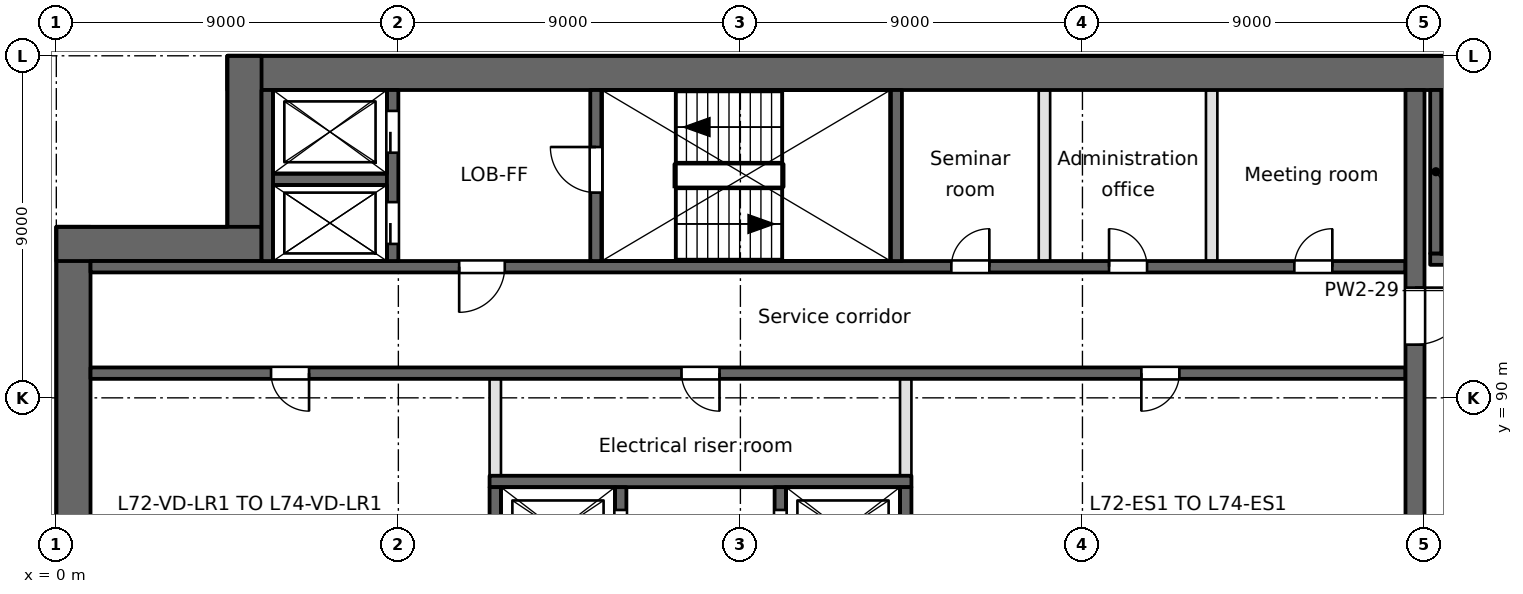
"""IFC4 building model, lengths in metres.
Left out: names, types, materials, properties, quantities, classifications, styles, units other than length and angle.
Written with IfcOpenShell. Run it as: python <this file> out.ifc"""

import sys

from ifc_helpers import new_model, si_unit, direction, frame, frame_2d, origin, place, context, subcontext, project, spatial, rectangle, extrude, element, fill, save


model = new_model("IFC4")
c1 = context("Model", 3, precision=1e-05, world=origin(), true_north=direction((0.0, 1.0)))
c2 = subcontext(c1, "Body", "Model", "MODEL_VIEW")
j1 = project(units=[si_unit("LENGTHUNIT", "METRE"), si_unit("PLANEANGLEUNIT", "RADIAN")], contexts=[c1])
p1 = place(None, origin())
s1 = spatial("IfcSite", under=j1, at=p1, CompositionType="ELEMENT")
p2 = place(p1, origin())
s2 = spatial("IfcBuilding", under=s1, at=p2, CompositionType="ELEMENT")
p3 = place(p2, frame((0.0, 0.0, 280.8)))
s3 = spatial("IfcBuildingStorey", under=s2, at=p3, CompositionType="ELEMENT", Elevation=280.8)
p4 = place(p3, frame((0.45, 94.5, 0.0), z_axis=(0.0, 0.0, 1.0), x_axis=(0.0, -1.0, 0.0)))
e1 = element("IfcWall", 1, at=p4, inside=s3, PredefinedType="SHEAR", context=c2, shape_type="SweptSolid", body=[
    extrude(rectangle(XDim=40.456, YDim=0.9, at=frame_2d((20.228, 0.0))), origin(), (0.0, 0.0, 1.0), 3.7),
])
p5 = place(p3, frame((49.5, 98.55, 0.0), z_axis=(0.0, 0.0, 1.0), x_axis=(-1.0, 0.0, 0.0)))
e2 = element("IfcWall", 2, at=p5, inside=s3, PredefinedType="SHEAR", context=c2, shape_type="SweptSolid", body=[
    extrude(rectangle(XDim=45.0, YDim=0.9, at=frame_2d((22.5, 0.0))), origin(), (0.0, 0.0, 1.0), 3.7),
])
for number, where, z_axis, x_axis in (
    (3, (4.95, 99.0, 0.0), (0.0, 0.0, 1.0), (0.0, -1.0, 0.0)),
    (4, (5.4, 94.05, 0.0), (0.0, 0.0, 1.0), (-1.0, 0.0, 0.0)),
):
    element("IfcWall", number, at=place(p3, frame(where, z_axis=z_axis, x_axis=x_axis)), inside=s3, PredefinedType="SHEAR", context=c2, shape_type="SweptSolid", body=[
        extrude(rectangle(XDim=5.4, YDim=0.9, at=frame_2d((2.7, 0.0))), origin(), (0.0, 0.0, 1.0), 3.7),
    ])
p6 = place(p3, frame((11.4, 87.8, -0.4), z_axis=(0.0, 0.0, 1.0), x_axis=(1.0, 0.0, 0.0)))
e5 = element("IfcWall", 5, at=p6, inside=s3, PredefinedType="SOLIDWALL", context=c2, shape_type="SweptSolid", body=[
    extrude(rectangle(XDim=11.1, YDim=0.3, at=frame_2d((5.55, 0.0))), origin(), (0.0, 0.0, 1.0), 3.7),
])
p7 = place(p3, frame((0.9, 90.65, -0.4), z_axis=(0.0, 0.0, 1.0), x_axis=(1.0, 0.0, 0.0)))
e6 = element("IfcWall", 6, at=p7, inside=s3, PredefinedType="SOLIDWALL", context=c2, shape_type="SweptSolid", body=[
    extrude(rectangle(XDim=34.6, YDim=0.3, at=frame_2d((17.3, 0.0))), origin(), (0.0, 0.0, 1.0), 3.7),
])
p8 = place(p7, frame((15.55, 0.0, 0.4)))
e7 = element("IfcOpeningElement", 7, at=p8, cuts=e6, PredefinedType="OPENING", context=c2, shape_type="SweptSolid", body=[
    extrude(rectangle(XDim=1.0, YDim=2.1, at=frame_2d((0.5, 1.05))), frame((0.0, 0.15, 0.0), z_axis=(0.0, -1.0, 0.0), x_axis=(1.0, 0.0, 0.0)), (0.0, 0.0, 1.0), 0.3),
])
p9 = place(p7, frame((4.75, 0.0, 0.4)))
e8 = element("IfcOpeningElement", 8, at=p9, cuts=e6, PredefinedType="OPENING", context=c2, shape_type="SweptSolid", body=[
    extrude(rectangle(XDim=1.0, YDim=2.1, at=frame_2d((0.5, 1.05))), frame((0.0, 0.15, 0.0), z_axis=(0.0, -1.0, 0.0), x_axis=(1.0, 0.0, 0.0)), (0.0, 0.0, 1.0), 0.3),
])
p10 = place(p7, frame((27.65, 0.0, 0.4)))
e9 = element("IfcOpeningElement", 9, at=p10, cuts=e6, PredefinedType="OPENING", context=c2, shape_type="SweptSolid", body=[
    extrude(rectangle(XDim=1.0, YDim=2.1, at=frame_2d((0.5, 1.05))), frame((0.0, 0.15, 0.0), z_axis=(0.0, -1.0, 0.0), x_axis=(1.0, 0.0, 0.0)), (0.0, 0.0, 1.0), 0.3),
])
p11 = place(p3, frame((0.9, 93.45, -0.4), z_axis=(0.0, 0.0, 1.0), x_axis=(1.0, 0.0, 0.0)))
e10 = element("IfcWall", 10, at=p11, inside=s3, PredefinedType="SOLIDWALL", context=c2, shape_type="SweptSolid", body=[
    extrude(rectangle(XDim=34.6, YDim=0.3, at=frame_2d((17.3, 0.0))), origin(), (0.0, 0.0, 1.0), 3.7),
])
p12 = place(p11, frame((9.7, 0.0, 0.4)))
e11 = element("IfcOpeningElement", 11, at=p12, cuts=e10, PredefinedType="OPENING", context=c2, shape_type="SweptSolid", body=[
    extrude(rectangle(XDim=1.2, YDim=2.1, at=frame_2d((0.6, 1.05))), frame((0.0, 0.15, 0.0), z_axis=(0.0, -1.0, 0.0), x_axis=(1.0, 0.0, 0.0)), (0.0, 0.0, 1.0), 0.3),
])
p13 = place(p11, frame((22.65, 0.0, 0.4)))
e12 = element("IfcOpeningElement", 12, at=p13, cuts=e10, PredefinedType="OPENING", context=c2, shape_type="SweptSolid", body=[
    extrude(rectangle(XDim=1.0, YDim=2.1, at=frame_2d((0.5, 1.05))), frame((0.0, 0.15, 0.0), z_axis=(0.0, -1.0, 0.0), x_axis=(1.0, 0.0, 0.0)), (0.0, 0.0, 1.0), 0.3),
])
p14 = place(p11, frame((26.8, 0.0, 0.4)))
e13 = element("IfcOpeningElement", 13, at=p14, cuts=e10, PredefinedType="OPENING", context=c2, shape_type="SweptSolid", body=[
    extrude(rectangle(XDim=1.0, YDim=2.1, at=frame_2d((0.5, 1.05))), frame((0.0, 0.15, 0.0), z_axis=(0.0, -1.0, 0.0), x_axis=(1.0, 0.0, 0.0)), (0.0, 0.0, 1.0), 0.3),
])
p15 = place(p11, frame((31.675, 0.0, 0.4)))
e14 = element("IfcOpeningElement", 14, at=p15, cuts=e10, PredefinedType="OPENING", context=c2, shape_type="SweptSolid", body=[
    extrude(rectangle(XDim=1.0, YDim=2.1, at=frame_2d((0.5, 1.05))), frame((0.0, 0.15, 0.0), z_axis=(0.0, -1.0, 0.0), x_axis=(1.0, 0.0, 0.0)), (0.0, 0.0, 1.0), 0.3),
])
p16 = place(p3, frame((36.15, 93.65, -0.4), z_axis=(0.0, 0.0, 1.0), x_axis=(1.0, 0.0, 0.0)))
e15 = element("IfcWall", 15, at=p16, inside=s3, PredefinedType="SOLIDWALL", context=c2, shape_type="SweptSolid", body=[
    extrude(rectangle(XDim=8.2, YDim=0.3, at=frame_2d((4.1, 0.0))), origin(), (0.0, 0.0, 1.0), 3.7),
])
p17 = place(p16, frame((0.7, 0.0, 0.4)))
e16 = element("IfcOpeningElement", 16, at=p17, cuts=e15, PredefinedType="OPENING", context=c2, shape_type="SweptSolid", body=[
    extrude(rectangle(XDim=1.2, YDim=2.1, at=frame_2d((0.6, 1.05))), frame((0.0, 0.15, 0.0), z_axis=(0.0, -1.0, 0.0), x_axis=(1.0, 0.0, 0.0)), (0.0, 0.0, 1.0), 0.3),
])
p18 = place(p3, frame((5.7, 95.75, -0.4), z_axis=(0.0, 0.0, 1.0), x_axis=(1.0, 0.0, 0.0)))
e17 = element("IfcWall", 17, at=p18, inside=s3, PredefinedType="SOLIDWALL", context=c2, shape_type="SweptSolid", body=[
    extrude(rectangle(XDim=3.0, YDim=0.3, at=frame_2d((1.5, 0.0))), origin(), (0.0, 0.0, 1.0), 3.7),
])
p19 = place(p3, frame((5.55, 93.6, -0.4), z_axis=(0.0, 0.0, 1.0), x_axis=(0.0, 1.0, 0.0)))
e18 = element("IfcWall", 18, at=p19, inside=s3, PredefinedType="SOLIDWALL", context=c2, shape_type="SweptSolid", body=[
    extrude(rectangle(XDim=4.5, YDim=0.3, at=frame_2d((2.25, 0.0))), origin(), (0.0, 0.0, 1.0), 3.7),
])
p20 = place(p3, frame((8.85, 93.6, -0.4), z_axis=(0.0, 0.0, 1.0), x_axis=(0.0, 1.0, 0.0)))
e19 = element("IfcWall", 19, at=p20, inside=s3, PredefinedType="SOLIDWALL", context=c2, shape_type="SweptSolid", body=[
    extrude(rectangle(XDim=4.5, YDim=0.3, at=frame_2d((2.25, 0.0))), origin(), (0.0, 0.0, 1.0), 3.7),
])
p21 = place(p20, frame((0.45, 0.0, 0.4)))
e20 = element("IfcOpeningElement", 20, at=p21, cuts=e19, PredefinedType="OPENING", context=c2, shape_type="SweptSolid", body=[
    extrude(rectangle(XDim=1.1, YDim=2.1, at=frame_2d((0.55, 1.05))), frame((0.0, 0.15, 0.0), z_axis=(0.0, -1.0, 0.0), x_axis=(1.0, 0.0, 0.0)), (0.0, 0.0, 1.0), 0.3),
])
p22 = place(p20, frame((2.85, 0.0, 0.4)))
e21 = element("IfcOpeningElement", 21, at=p22, cuts=e19, PredefinedType="OPENING", context=c2, shape_type="SweptSolid", body=[
    extrude(rectangle(XDim=1.1, YDim=2.1, at=frame_2d((0.55, 1.05))), frame((0.0, 0.15, 0.0), z_axis=(0.0, -1.0, 0.0), x_axis=(1.0, 0.0, 0.0)), (0.0, 0.0, 1.0), 0.3),
])
p23 = place(p3, frame((11.55, 77.55, -0.4), z_axis=(0.0, 0.0, 1.0), x_axis=(0.0, 1.0, 0.0)))
e22 = element("IfcWall", 22, at=p23, inside=s3, PredefinedType="SOLIDWALL", context=c2, shape_type="SweptSolid", body=[
    extrude(rectangle(XDim=10.1, YDim=0.3, at=frame_2d((5.05, 0.0))), origin(), (0.0, 0.0, 1.0), 3.7),
])
p24 = place(p3, frame((11.55, 87.95, 0.0), z_axis=(0.0, 0.0, 1.0), x_axis=(0.0, 1.0, 0.0)))
e23 = element("IfcWall", 23, at=p24, inside=s3, PredefinedType="PARTITIONING", context=c2, shape_type="SweptSolid", body=[
    extrude(rectangle(XDim=2.55, YDim=0.3, at=frame_2d((1.275, 0.0))), origin(), (0.0, 0.0, 1.0), 3.3),
])
p25 = place(p3, frame((14.2, 93.6, -0.4), z_axis=(0.0, 0.0, 1.0), x_axis=(0.0, 1.0, 0.0)))
e24 = element("IfcWall", 24, at=p25, inside=s3, PredefinedType="SOLIDWALL", context=c2, shape_type="SweptSolid", body=[
    extrude(rectangle(XDim=4.5, YDim=0.3, at=frame_2d((2.25, 0.0))), origin(), (0.0, 0.0, 1.0), 3.7),
])
p26 = place(p25, frame((1.8, 0.0, 0.4)))
e25 = element("IfcOpeningElement", 25, at=p26, cuts=e24, PredefinedType="OPENING", context=c2, shape_type="SweptSolid", body=[
    extrude(rectangle(XDim=1.2, YDim=2.1, at=frame_2d((0.6, 1.05))), frame((0.0, 0.15, 0.0), z_axis=(0.0, -1.0, 0.0), x_axis=(1.0, 0.0, 0.0)), (0.0, 0.0, 1.0), 0.3),
])
p27 = place(p3, frame((14.85, 77.55, -0.4), z_axis=(0.0, 0.0, 1.0), x_axis=(0.0, 1.0, 0.0)))
e26 = element("IfcWall", 26, at=p27, inside=s3, PredefinedType="SOLIDWALL", context=c2, shape_type="SweptSolid", body=[
    extrude(rectangle(XDim=10.1, YDim=0.3, at=frame_2d((5.05, 0.0))), origin(), (0.0, 0.0, 1.0), 3.7),
])
p28 = place(p27, frame((0.6, 0.0, 0.4)))
e27 = element("IfcOpeningElement", 27, at=p28, cuts=e26, PredefinedType="OPENING", context=c2, shape_type="SweptSolid", body=[
    extrude(rectangle(XDim=1.1, YDim=2.1, at=frame_2d((0.55, 1.05))), frame((0.0, 0.15, 0.0), z_axis=(0.0, -1.0, 0.0), x_axis=(1.0, 0.0, 0.0)), (0.0, 0.0, 1.0), 0.3),
])
p29 = place(p27, frame((3.2, 0.0, 0.4)))
e28 = element("IfcOpeningElement", 28, at=p29, cuts=e26, PredefinedType="OPENING", context=c2, shape_type="SweptSolid", body=[
    extrude(rectangle(XDim=1.1, YDim=2.1, at=frame_2d((0.55, 1.05))), frame((0.0, 0.15, 0.0), z_axis=(0.0, -1.0, 0.0), x_axis=(1.0, 0.0, 0.0)), (0.0, 0.0, 1.0), 0.3),
])
p30 = place(p27, frame((5.8, 0.0, 0.4)))
e29 = element("IfcOpeningElement", 29, at=p30, cuts=e26, PredefinedType="OPENING", context=c2, shape_type="SweptSolid", body=[
    extrude(rectangle(XDim=1.1, YDim=2.1, at=frame_2d((0.55, 1.05))), frame((0.0, 0.15, 0.0), z_axis=(0.0, -1.0, 0.0), x_axis=(1.0, 0.0, 0.0)), (0.0, 0.0, 1.0), 0.3),
])
p31 = place(p27, frame((8.4, 0.0, 0.4)))
e30 = element("IfcOpeningElement", 30, at=p31, cuts=e26, PredefinedType="OPENING", context=c2, shape_type="SweptSolid", body=[
    extrude(rectangle(XDim=1.1, YDim=2.1, at=frame_2d((0.55, 1.05))), frame((0.0, 0.15, 0.0), z_axis=(0.0, -1.0, 0.0), x_axis=(1.0, 0.0, 0.0)), (0.0, 0.0, 1.0), 0.3),
])
p32 = place(p3, frame((19.05, 77.55, -0.4), z_axis=(0.0, 0.0, 1.0), x_axis=(0.0, 1.0, 0.0)))
e31 = element("IfcWall", 31, at=p32, inside=s3, PredefinedType="SOLIDWALL", context=c2, shape_type="SweptSolid", body=[
    extrude(rectangle(XDim=10.1, YDim=0.3, at=frame_2d((5.05, 0.0))), origin(), (0.0, 0.0, 1.0), 3.7),
])
p33 = place(p32, frame((0.6, 0.0, 0.4)))
e32 = element("IfcOpeningElement", 32, at=p33, cuts=e31, PredefinedType="OPENING", context=c2, shape_type="SweptSolid", body=[
    extrude(rectangle(XDim=1.1, YDim=2.1, at=frame_2d((0.55, 1.05))), frame((0.0, 0.15, 0.0), z_axis=(0.0, -1.0, 0.0), x_axis=(1.0, 0.0, 0.0)), (0.0, 0.0, 1.0), 0.3),
])
p34 = place(p32, frame((3.2, 0.0, 0.4)))
e33 = element("IfcOpeningElement", 33, at=p34, cuts=e31, PredefinedType="OPENING", context=c2, shape_type="SweptSolid", body=[
    extrude(rectangle(XDim=1.1, YDim=2.1, at=frame_2d((0.55, 1.05))), frame((0.0, 0.15, 0.0), z_axis=(0.0, -1.0, 0.0), x_axis=(1.0, 0.0, 0.0)), (0.0, 0.0, 1.0), 0.3),
])
p35 = place(p32, frame((5.8, 0.0, 0.4)))
e34 = element("IfcOpeningElement", 34, at=p35, cuts=e31, PredefinedType="OPENING", context=c2, shape_type="SweptSolid", body=[
    extrude(rectangle(XDim=1.1, YDim=2.1, at=frame_2d((0.55, 1.05))), frame((0.0, 0.15, 0.0), z_axis=(0.0, -1.0, 0.0), x_axis=(1.0, 0.0, 0.0)), (0.0, 0.0, 1.0), 0.3),
])
p36 = place(p32, frame((8.4, 0.0, 0.4)))
e35 = element("IfcOpeningElement", 35, at=p36, cuts=e31, PredefinedType="OPENING", context=c2, shape_type="SweptSolid", body=[
    extrude(rectangle(XDim=1.1, YDim=2.1, at=frame_2d((0.55, 1.05))), frame((0.0, 0.15, 0.0), z_axis=(0.0, -1.0, 0.0), x_axis=(1.0, 0.0, 0.0)), (0.0, 0.0, 1.0), 0.3),
])
p37 = place(p3, frame((22.1, 93.6, -0.4), z_axis=(0.0, 0.0, 1.0), x_axis=(0.0, 1.0, 0.0)))
e36 = element("IfcWall", 36, at=p37, inside=s3, PredefinedType="SOLIDWALL", context=c2, shape_type="SweptSolid", body=[
    extrude(rectangle(XDim=4.5, YDim=0.3, at=frame_2d((2.25, 0.0))), origin(), (0.0, 0.0, 1.0), 3.7),
])
p38 = place(p3, frame((22.35, 77.55, -0.4), z_axis=(0.0, 0.0, 1.0), x_axis=(0.0, 1.0, 0.0)))
e37 = element("IfcWall", 37, at=p38, inside=s3, PredefinedType="SOLIDWALL", context=c2, shape_type="SweptSolid", body=[
    extrude(rectangle(XDim=10.1, YDim=0.3, at=frame_2d((5.05, 0.0))), origin(), (0.0, 0.0, 1.0), 3.7),
])
p39 = place(p3, frame((22.35, 87.95, 0.0), z_axis=(0.0, 0.0, 1.0), x_axis=(0.0, 1.0, 0.0)))
e38 = element("IfcWall", 38, at=p39, inside=s3, PredefinedType="PARTITIONING", context=c2, shape_type="SweptSolid", body=[
    extrude(rectangle(XDim=2.55, YDim=0.3, at=frame_2d((1.275, 0.0))), origin(), (0.0, 0.0, 1.0), 3.3),
])
for number, where, z_axis, x_axis in (
    (39, (26.0, 93.6, 0.0), (0.0, 0.0, 1.0), (0.0, 1.0, 0.0)),
    (40, (30.4, 93.6, 0.0), (0.0, 0.0, 1.0), (0.0, 1.0, 0.0)),
):
    element("IfcWall", number, at=place(p3, frame(where, z_axis=z_axis, x_axis=x_axis)), inside=s3, PredefinedType="PARTITIONING", context=c2, shape_type="SweptSolid", body=[
        extrude(rectangle(XDim=4.5, YDim=0.3, at=frame_2d((2.25, 0.0))), origin(), (0.0, 0.0, 1.0), 3.3),
    ])
p40 = place(p3, frame((35.75, 63.5, -0.4), z_axis=(0.0, 0.0, 1.0), x_axis=(0.0, 1.0, 0.0)))
e41 = element("IfcWall", 41, at=p40, inside=s3, PredefinedType="SOLIDWALL", context=c2, shape_type="SweptSolid", body=[
    extrude(rectangle(XDim=34.6, YDim=0.5, at=frame_2d((17.3, 0.0))), origin(), (0.0, 0.0, 1.0), 3.7),
])
p41 = place(p40, frame((9.7, 0.0, 0.4)))
e42 = element("IfcOpeningElement", 42, at=p41, cuts=e41, PredefinedType="OPENING", context=c2, shape_type="SweptSolid", body=[
    extrude(rectangle(XDim=2.4, YDim=2.1, at=frame_2d((1.2, 1.05))), frame((0.0, 0.25, 0.0), z_axis=(0.0, -1.0, 0.0), x_axis=(1.0, 0.0, 0.0)), (0.0, 0.0, 1.0), 0.5),
])
p42 = place(p40, frame((27.9, 0.0, 0.4)))
e43 = element("IfcOpeningElement", 43, at=p42, cuts=e41, PredefinedType="OPENING", context=c2, shape_type="SweptSolid", body=[
    extrude(rectangle(XDim=1.5, YDim=2.1, at=frame_2d((0.75, 1.05))), frame((0.0, 0.25, 0.0), z_axis=(0.0, -1.0, 0.0), x_axis=(1.0, 0.0, 0.0)), (0.0, 0.0, 1.0), 0.5),
])
p43 = place(p40, frame((1.5, 0.0, 0.4)))
e44 = element("IfcOpeningElement", 44, at=p43, cuts=e41, PredefinedType="OPENING", context=c2, shape_type="SweptSolid", body=[
    extrude(rectangle(XDim=1.2, YDim=2.1, at=frame_2d((0.6, 1.05))), frame((0.0, 0.25, 0.0), z_axis=(0.0, -1.0, 0.0), x_axis=(1.0, 0.0, 0.0)), (0.0, 0.0, 1.0), 0.5),
])
p44 = place(p3, frame((36.3, 93.8, -0.4), z_axis=(0.0, 0.0, 1.0), x_axis=(0.0, 1.0, 0.0)))
e45 = element("IfcWall", 45, at=p44, inside=s3, PredefinedType="SOLIDWALL", context=c2, shape_type="SweptSolid", body=[
    extrude(rectangle(XDim=4.3, YDim=0.3, at=frame_2d((2.15, 0.0))), origin(), (0.0, 0.0, 1.0), 3.7),
])
p45 = place(p31, origin())
e46 = element("IfcDoor", 46, at=p45, inside=s3, OperationType="SLIDING_TO_LEFT", PredefinedType="DOOR", context=c2, shape_type="SweptSolid", body=[
    extrude(rectangle(XDim=1.1, YDim=2.1, at=frame_2d((0.55, 1.05))), frame((0.0, 0.025, 0.0), z_axis=(0.0, -1.0, 0.0), x_axis=(1.0, 0.0, 0.0)), (0.0, 0.0, 1.0), 0.05),
])
fill(e30, e46)
p46 = place(p36, origin())
e47 = element("IfcDoor", 47, at=p46, inside=s3, OperationType="SLIDING_TO_LEFT", PredefinedType="DOOR", context=c2, shape_type="SweptSolid", body=[
    extrude(rectangle(XDim=1.1, YDim=2.1, at=frame_2d((0.55, 1.05))), frame((0.0, 0.025, 0.0), z_axis=(0.0, -1.0, 0.0), x_axis=(1.0, 0.0, 0.0)), (0.0, 0.0, 1.0), 0.05),
])
fill(e35, e47)
p47 = place(p21, origin())
e48 = element("IfcDoor", 48, at=p47, inside=s3, OperationType="SLIDING_TO_RIGHT", PredefinedType="DOOR", context=c2, shape_type="SweptSolid", body=[
    extrude(rectangle(XDim=1.1, YDim=2.1, at=frame_2d((0.55, 1.05))), frame((0.0, 0.025, 0.0), z_axis=(0.0, -1.0, 0.0), x_axis=(1.0, 0.0, 0.0)), (0.0, 0.0, 1.0), 0.05),
])
fill(e20, e48)
p48 = place(p22, origin())
e49 = element("IfcDoor", 49, at=p48, inside=s3, OperationType="SLIDING_TO_LEFT", PredefinedType="DOOR", context=c2, shape_type="SweptSolid", body=[
    extrude(rectangle(XDim=1.1, YDim=2.1, at=frame_2d((0.55, 1.05))), frame((0.0, 0.025, 0.0), z_axis=(0.0, -1.0, 0.0), x_axis=(1.0, 0.0, 0.0)), (0.0, 0.0, 1.0), 0.05),
])
fill(e21, e49)
p49 = place(p12, frame((1.2, 0.0, 0.0), z_axis=(0.0, 0.0, 1.0), x_axis=(-1.0, 0.0, 0.0)))
e50 = element("IfcDoor", 50, at=p49, inside=s3, OperationType="SINGLE_SWING_RIGHT", PredefinedType="DOOR", context=c2, shape_type="SweptSolid", body=[
    extrude(rectangle(XDim=1.2, YDim=2.1, at=frame_2d((0.6, 1.05))), frame((0.0, 0.025, 0.0), z_axis=(0.0, -1.0, 0.0), x_axis=(1.0, 0.0, 0.0)), (0.0, 0.0, 1.0), 0.05),
])
fill(e11, e50)
p50 = place(p42, frame((1.5, 0.0, 0.0), z_axis=(0.0, 0.0, 1.0), x_axis=(-1.0, 0.0, 0.0)))
e51 = element("IfcDoor", 51, at=p50, inside=s3, OperationType="SINGLE_SWING_LEFT", PredefinedType="DOOR", context=c2, shape_type="SweptSolid", body=[
    extrude(rectangle(XDim=1.5, YDim=2.1, at=frame_2d((0.75, 1.05))), frame((0.0, 0.025, 0.0), z_axis=(0.0, -1.0, 0.0), x_axis=(1.0, 0.0, 0.0)), (0.0, 0.0, 1.0), 0.05),
])
fill(e43, e51)
p51 = place(p26, origin())
e52 = element("IfcDoor", 52, at=p51, inside=s3, OperationType="SINGLE_SWING_RIGHT", PredefinedType="DOOR", context=c2, shape_type="SweptSolid", body=[
    extrude(rectangle(XDim=1.2, YDim=2.1, at=frame_2d((0.6, 1.05))), frame((0.0, 0.025, 0.0), z_axis=(0.0, -1.0, 0.0), x_axis=(1.0, 0.0, 0.0)), (0.0, 0.0, 1.0), 0.05),
])
fill(e25, e52)
p52 = place(p8, frame((1.0, 0.0, 0.0), z_axis=(0.0, 0.0, 1.0), x_axis=(-1.0, 0.0, 0.0)))
e53 = element("IfcDoor", 53, at=p52, inside=s3, OperationType="SINGLE_SWING_LEFT", PredefinedType="DOOR", context=c2, shape_type="SweptSolid", body=[
    extrude(rectangle(XDim=1.0, YDim=2.1, at=frame_2d((0.5, 1.05))), frame((0.0, 0.025, 0.0), z_axis=(0.0, -1.0, 0.0), x_axis=(1.0, 0.0, 0.0)), (0.0, 0.0, 1.0), 0.05),
])
fill(e7, e53)
p53 = place(p9, frame((1.0, 0.0, 0.0), z_axis=(0.0, 0.0, 1.0), x_axis=(-1.0, 0.0, 0.0)))
e54 = element("IfcDoor", 54, at=p53, inside=s3, OperationType="SINGLE_SWING_LEFT", PredefinedType="DOOR", context=c2, shape_type="SweptSolid", body=[
    extrude(rectangle(XDim=1.0, YDim=2.1, at=frame_2d((0.5, 1.05))), frame((0.0, 0.025, 0.0), z_axis=(0.0, -1.0, 0.0), x_axis=(1.0, 0.0, 0.0)), (0.0, 0.0, 1.0), 0.05),
])
fill(e8, e54)
p54 = place(p10, frame((1.0, 0.0, 0.0), z_axis=(0.0, 0.0, 1.0), x_axis=(-1.0, 0.0, 0.0)))
e55 = element("IfcDoor", 55, at=p54, inside=s3, OperationType="SINGLE_SWING_RIGHT", PredefinedType="DOOR", context=c2, shape_type="SweptSolid", body=[
    extrude(rectangle(XDim=1.0, YDim=2.1, at=frame_2d((0.5, 1.05))), frame((0.0, 0.025, 0.0), z_axis=(0.0, -1.0, 0.0), x_axis=(1.0, 0.0, 0.0)), (0.0, 0.0, 1.0), 0.05),
])
fill(e9, e55)
p55 = place(p13, origin())
e56 = element("IfcDoor", 56, at=p55, inside=s3, OperationType="SINGLE_SWING_RIGHT", PredefinedType="DOOR", context=c2, shape_type="SweptSolid", body=[
    extrude(rectangle(XDim=1.0, YDim=2.1, at=frame_2d((0.5, 1.05))), frame((0.0, 0.025, 0.0), z_axis=(0.0, -1.0, 0.0), x_axis=(1.0, 0.0, 0.0)), (0.0, 0.0, 1.0), 0.05),
])
fill(e12, e56)
p56 = place(p14, origin())
e57 = element("IfcDoor", 57, at=p56, inside=s3, OperationType="SINGLE_SWING_LEFT", PredefinedType="DOOR", context=c2, shape_type="SweptSolid", body=[
    extrude(rectangle(XDim=1.0, YDim=2.1, at=frame_2d((0.5, 1.05))), frame((0.0, 0.025, 0.0), z_axis=(0.0, -1.0, 0.0), x_axis=(1.0, 0.0, 0.0)), (0.0, 0.0, 1.0), 0.05),
])
fill(e13, e57)
p57 = place(p15, origin())
e58 = element("IfcDoor", 58, at=p57, inside=s3, OperationType="SINGLE_SWING_RIGHT", PredefinedType="DOOR", context=c2, shape_type="SweptSolid", body=[
    extrude(rectangle(XDim=1.0, YDim=2.1, at=frame_2d((0.5, 1.05))), frame((0.0, 0.025, 0.0), z_axis=(0.0, -1.0, 0.0), x_axis=(1.0, 0.0, 0.0)), (0.0, 0.0, 1.0), 0.05),
])
fill(e14, e58)
save(model, sys.argv[1])
